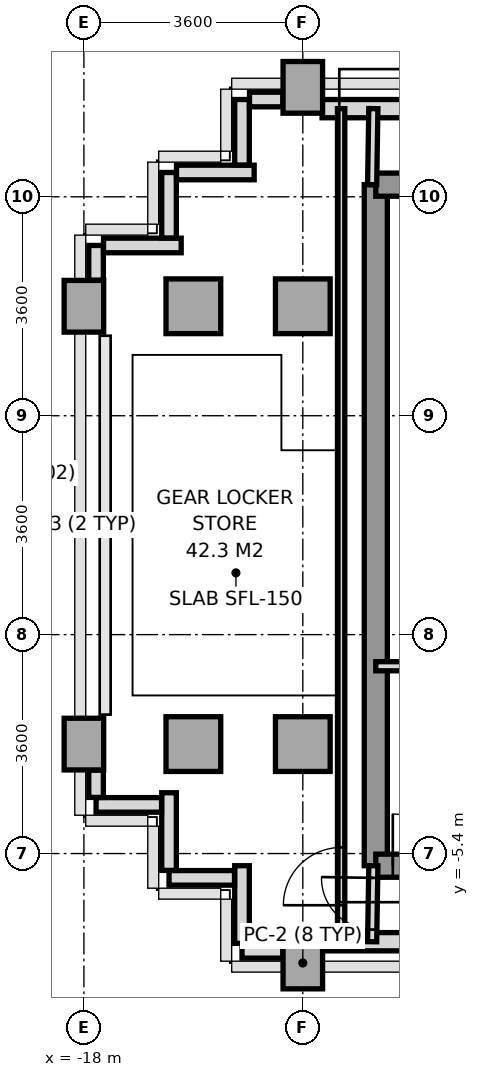
"""IFC4 building model, lengths in metres.
Left out: names, types, materials, properties, quantities, classifications, styles, units other than length and angle.
Written with IfcOpenShell. Run it as: python <this file> out.ifc"""

import sys

from ifc_helpers import new_model, si_unit, direction, frame, frame_2d, origin, origin_2d, place, context, subcontext, project, spatial, rectangle, extrude, source, transform, mapped, element, fill, save


model = new_model("IFC4")
c1 = context("Model", 3, precision=1e-05, world=origin(), true_north=direction((0.0, 1.0)))
c2 = subcontext(c1, "Body", "Model", "MODEL_VIEW")
j1 = project(units=[si_unit("LENGTHUNIT", "METRE"), si_unit("PLANEANGLEUNIT", "RADIAN")], contexts=[c1])
p1 = place(None, origin())
s1 = spatial("IfcSite", under=j1, at=p1, CompositionType="ELEMENT")
p2 = place(p1, origin())
s2 = spatial("IfcBuilding", under=s1, at=p2, CompositionType="ELEMENT")
p3 = place(p2, frame((0.0, 0.0, 160.4)))
s3 = spatial("IfcBuildingStorey", under=s2, at=p3, CompositionType="ELEMENT", Elevation=160.4)
m1 = source(origin(), c2, "Body", "SweptSolid", [
    extrude(rectangle(XDim=0.65, YDim=0.85, at=origin_2d()), origin(), (0.0, 0.0, 1.0), 3.2),
])
for number, where, z_axis, x_axis in (
    (1, (-18.0, -3.6, 0.0), (0.0, 0.0, 1.0), (1.0, 0.0, 0.0)),
    (2, (-18.0, 3.6, 0.0), (0.0, 0.0, 1.0), (1.0, 0.0, 0.0)),
):
    element("IfcColumn", number, at=place(p3, frame(where, z_axis=z_axis, x_axis=x_axis)), inside=s3, PredefinedType="COLUMN", context=c2, shape_type="MappedRepresentation", body=[
        mapped(m1, transform((0.0, 0.0, 0.0), x_axis=(1.0, 0.0, 0.0), y_axis=(0.0, 1.0, 0.0), z_axis=(0.0, 0.0, 1.0), scale=1.0)),
    ])
m2 = source(origin(), c2, "Body", "SweptSolid", [
    extrude(rectangle(XDim=0.9, YDim=0.9, at=origin_2d()), origin(), (0.0, 0.0, 1.0), 3.2),
])
for number, where, z_axis, x_axis in (
    (3, (-16.2, -3.6, 0.0), (0.0, 0.0, 1.0), (1.0, 0.0, 0.0)),
    (4, (-16.2, 3.6, 0.0), (0.0, 0.0, 1.0), (1.0, 0.0, 0.0)),
):
    element("IfcColumn", number, at=place(p3, frame(where, z_axis=z_axis, x_axis=x_axis)), inside=s3, PredefinedType="COLUMN", context=c2, shape_type="MappedRepresentation", body=[
        mapped(m2, transform((0.0, 0.0, 0.0), x_axis=(1.0, 0.0, 0.0), y_axis=(0.0, 1.0, 0.0), z_axis=(0.0, 0.0, 1.0), scale=1.0)),
    ])
p4 = place(p3, frame((-14.4, -7.2, 0.0), z_axis=(0.0, 0.0, 1.0), x_axis=(1.0, 0.0, 0.0)))
e5 = element("IfcColumn", 5, at=p4, inside=s3, PredefinedType="COLUMN", context=c2, shape_type="MappedRepresentation", body=[
    mapped(m1, transform((0.0, 0.0, 0.0), x_axis=(1.0, 0.0, 0.0), y_axis=(0.0, 1.0, 0.0), z_axis=(0.0, 0.0, 1.0), scale=1.0)),
])
for number, where, z_axis, x_axis in (
    (6, (-14.4, -3.6, 0.0), (0.0, 0.0, 1.0), (1.0, 0.0, 0.0)),
    (7, (-14.4, 3.6, 0.0), (0.0, 0.0, 1.0), (1.0, 0.0, 0.0)),
):
    element("IfcColumn", number, at=place(p3, frame(where, z_axis=z_axis, x_axis=x_axis)), inside=s3, PredefinedType="COLUMN", context=c2, shape_type="MappedRepresentation", body=[
        mapped(m2, transform((0.0, 0.0, 0.0), x_axis=(1.0, 0.0, 0.0), y_axis=(0.0, 1.0, 0.0), z_axis=(0.0, 0.0, 1.0), scale=1.0)),
    ])
p5 = place(p3, frame((-14.4, 7.2, 0.0), z_axis=(0.0, 0.0, 1.0), x_axis=(1.0, 0.0, 0.0)))
e8 = element("IfcColumn", 8, at=p5, inside=s3, PredefinedType="COLUMN", context=c2, shape_type="MappedRepresentation", body=[
    mapped(m1, transform((0.0, 0.0, 0.0), x_axis=(1.0, 0.0, 0.0), y_axis=(0.0, 1.0, 0.0), z_axis=(0.0, 0.0, 1.0), scale=1.0)),
])
p6 = place(p3, frame((-14.083, 6.85, 0.0), z_axis=(0.0, 0.0, 1.0), x_axis=(1.0, 0.0, 0.0)))
e9 = element("IfcWall", 9, at=p6, inside=s3, PredefinedType="SOLIDWALL", context=c2, shape_type="SweptSolid", body=[
    extrude(rectangle(XDim=2.635, YDim=0.3, at=frame_2d((1.317, 0.0))), origin(), (0.0, 0.0, 1.0), 3.2),
])
p7 = place(p3, frame((-14.083, -6.85, 0.0), z_axis=(0.0, 0.0, 1.0), x_axis=(1.0, 0.0, 0.0)))
e10 = element("IfcWall", 10, at=p7, inside=s3, PredefinedType="SOLIDWALL", context=c2, shape_type="SweptSolid", body=[
    extrude(rectangle(XDim=2.333, YDim=0.3, at=frame_2d((1.167, 0.0))), origin(), (0.0, 0.0, 1.0), 3.2),
])
p8 = place(p3, frame((-14.728, -7.0, 0.0), z_axis=(0.0, 0.0, 1.0), x_axis=(-1.0, 0.0, 0.0)))
e11 = element("IfcWall", 11, at=p8, inside=s3, PredefinedType="PARAPET", context=c2, shape_type="SweptSolid", body=[
    extrude(rectangle(XDim=0.672, YDim=0.24, at=frame_2d((0.336, 0.0))), origin(), (0.0, 0.0, 1.0), 1.15),
])
p9 = place(p3, frame((-15.4, -6.877, 0.0), z_axis=(0.0, 0.0, 1.0), x_axis=(0.0, 1.0, 0.0)))
e12 = element("IfcWall", 12, at=p9, inside=s3, PredefinedType="PARAPET", context=c2, shape_type="SweptSolid", body=[
    extrude(rectangle(XDim=1.277, YDim=0.24, at=frame_2d((0.638, 0.0))), origin(), (0.0, 0.0, 1.0), 1.15),
])
p10 = place(p3, frame((-15.523, -5.8, 0.0), z_axis=(0.0, 0.0, 1.0), x_axis=(-1.0, 0.0, 0.0)))
e13 = element("IfcWall", 13, at=p10, inside=s3, PredefinedType="PARAPET", context=c2, shape_type="SweptSolid", body=[
    extrude(rectangle(XDim=1.077, YDim=0.24, at=frame_2d((0.539, 0.0))), origin(), (0.0, 0.0, 1.0), 1.15),
])
p11 = place(p3, frame((-16.6, -5.677, 0.0), z_axis=(0.0, 0.0, 1.0), x_axis=(0.0, 1.0, 0.0)))
e14 = element("IfcWall", 14, at=p11, inside=s3, PredefinedType="PARAPET", context=c2, shape_type="SweptSolid", body=[
    extrude(rectangle(XDim=1.277, YDim=0.24, at=frame_2d((0.639, 0.0))), origin(), (0.0, 0.0, 1.0), 1.15),
])
p12 = place(p3, frame((-16.723, -4.6, 0.0), z_axis=(0.0, 0.0, 1.0), x_axis=(-1.0, 0.0, 0.0)))
e15 = element("IfcWall", 15, at=p12, inside=s3, PredefinedType="PARAPET", context=c2, shape_type="SweptSolid", body=[
    extrude(rectangle(XDim=1.077, YDim=0.24, at=frame_2d((0.539, 0.0))), origin(), (0.0, 0.0, 1.0), 1.15),
])
p13 = place(p3, frame((-17.8, -4.477, 0.0), z_axis=(0.0, 0.0, 1.0), x_axis=(0.0, 1.0, 0.0)))
e16 = element("IfcWall", 16, at=p13, inside=s3, PredefinedType="PARAPET", context=c2, shape_type="SweptSolid", body=[
    extrude(rectangle(XDim=0.449, YDim=0.24, at=frame_2d((0.225, 0.0))), origin(), (0.0, 0.0, 1.0), 1.15),
])
p14 = place(p3, frame((-17.8, 4.028, 0.0), z_axis=(0.0, 0.0, 1.0), x_axis=(0.0, 1.0, 0.0)))
e17 = element("IfcWall", 17, at=p14, inside=s3, PredefinedType="PARAPET", context=c2, shape_type="SweptSolid", body=[
    extrude(rectangle(XDim=0.572, YDim=0.24, at=frame_2d((0.286, 0.0))), origin(), (0.0, 0.0, 1.0), 1.15),
])
p15 = place(p3, frame((-17.677, 4.6, 0.0), z_axis=(0.0, 0.0, 1.0), x_axis=(1.0, 0.0, 0.0)))
e18 = element("IfcWall", 18, at=p15, inside=s3, PredefinedType="PARAPET", context=c2, shape_type="SweptSolid", body=[
    extrude(rectangle(XDim=1.277, YDim=0.24, at=frame_2d((0.639, 0.0))), origin(), (0.0, 0.0, 1.0), 1.15),
])
p16 = place(p3, frame((-16.6, 4.723, 0.0), z_axis=(0.0, 0.0, 1.0), x_axis=(0.0, 1.0, 0.0)))
e19 = element("IfcWall", 19, at=p16, inside=s3, PredefinedType="PARAPET", context=c2, shape_type="SweptSolid", body=[
    extrude(rectangle(XDim=1.077, YDim=0.24, at=frame_2d((0.539, 0.0))), origin(), (0.0, 0.0, 1.0), 1.15),
])
p17 = place(p3, frame((-16.477, 5.8, 0.0), z_axis=(0.0, 0.0, 1.0), x_axis=(1.0, 0.0, 0.0)))
e20 = element("IfcWall", 20, at=p17, inside=s3, PredefinedType="PARAPET", context=c2, shape_type="SweptSolid", body=[
    extrude(rectangle(XDim=1.277, YDim=0.24, at=frame_2d((0.639, 0.0))), origin(), (0.0, 0.0, 1.0), 1.15),
])
p18 = place(p3, frame((-15.4, 5.923, 0.0), z_axis=(0.0, 0.0, 1.0), x_axis=(0.0, 1.0, 0.0)))
e21 = element("IfcWall", 21, at=p18, inside=s3, PredefinedType="PARAPET", context=c2, shape_type="SweptSolid", body=[
    extrude(rectangle(XDim=1.077, YDim=0.24, at=frame_2d((0.539, 0.0))), origin(), (0.0, 0.0, 1.0), 1.15),
])
p19 = place(p3, frame((-15.277, 7.0, 0.0), z_axis=(0.0, 0.0, 1.0), x_axis=(1.0, 0.0, 0.0)))
e22 = element("IfcWall", 22, at=p19, inside=s3, PredefinedType="PARAPET", context=c2, shape_type="SweptSolid", body=[
    extrude(rectangle(XDim=0.549, YDim=0.24, at=frame_2d((0.274, 0.0))), origin(), (0.0, 0.0, 1.0), 1.15),
])
p20 = place(p3, frame((-13.2, -5.6, 0.0), z_axis=(0.0, 0.0, 1.0), x_axis=(0.0, 1.0, 0.0)))
e23 = element("IfcWall", 23, at=p20, inside=s3, PredefinedType="SHEAR", context=c2, shape_type="SweptSolid", body=[
    extrude(rectangle(XDim=11.2, YDim=0.38, at=frame_2d((5.6, 0.0))), origin(), (0.0, 0.0, 1.0), 3.2),
])
p21 = place(p3, frame((-13.2, 5.6, 0.0), z_axis=(0.0, 0.0, 1.0), x_axis=(1.0, 0.0, 0.0)))
e24 = element("IfcWall", 24, at=p21, inside=s3, PredefinedType="SHEAR", context=c2, shape_type="SweptSolid", body=[
    extrude(rectangle(XDim=1.844, YDim=0.38, at=frame_2d((0.922, 0.0))), origin(), (0.0, 0.0, 1.0), 3.2),
])
p22 = place(p3, frame((-13.2, -5.6, 0.0), z_axis=(0.0, 0.0, 1.0), x_axis=(1.0, 0.0, 0.0)))
e25 = element("IfcWall", 25, at=p22, inside=s3, PredefinedType="SHEAR", context=c2, shape_type="SweptSolid", body=[
    extrude(rectangle(XDim=7.8, YDim=0.38, at=frame_2d((3.9, 0.0))), origin(), (0.0, 0.0, 1.0), 3.2),
])
p23 = place(p22, frame((3.6, 0.0, 0.0)))
e26 = element("IfcOpeningElement", 26, at=p23, cuts=e25, PredefinedType="OPENING", context=c2, shape_type="SweptSolid", body=[
    extrude(rectangle(XDim=1.2, YDim=2.2, at=frame_2d((0.6, 1.1))), frame((0.0, 0.2, 0.0), z_axis=(0.0, -1.0, 0.0), x_axis=(1.0, 0.0, 0.0)), (0.0, 0.0, 1.0), 0.4),
])
p24 = place(p22, frame((0.28, 0.0, 0.0)))
e27 = element("IfcOpeningElement", 27, at=p24, cuts=e25, PredefinedType="OPENING", context=c2, shape_type="SweptSolid", body=[
    extrude(rectangle(XDim=0.85, YDim=2.1, at=frame_2d((0.425, 1.05))), frame((0.0, 0.2, 0.0), z_axis=(0.0, -1.0, 0.0), x_axis=(1.0, 0.0, 0.0)), (0.0, 0.0, 1.0), 0.4),
])
p25 = place(p22, frame((1.36, 0.0, 0.0)))
e28 = element("IfcOpeningElement", 28, at=p25, cuts=e25, PredefinedType="OPENING", context=c2, shape_type="SweptSolid", body=[
    extrude(rectangle(XDim=0.85, YDim=2.1, at=frame_2d((0.425, 1.05))), frame((0.0, 0.2, 0.0), z_axis=(0.0, -1.0, 0.0), x_axis=(1.0, 0.0, 0.0)), (0.0, 0.0, 1.0), 0.4),
])
p26 = place(p3, frame((-13.2, -2.32, 0.0), z_axis=(0.0, 0.0, 1.0), x_axis=(1.0, 0.0, 0.0)))
e29 = element("IfcWall", 29, at=p26, inside=s3, PredefinedType="PARTITIONING", context=c2, shape_type="SweptSolid", body=[
    extrude(rectangle(XDim=2.18, YDim=0.15, at=frame_2d((1.09, 0.0))), origin(), (0.0, 0.0, 1.0), 3.2),
])
p27 = place(p3, frame((-13.26, 5.6, 0.0), z_axis=(0.0, 0.0, 1.0), x_axis=(0.016013571389, 0.999871774545, 0.0)))
e30 = element("IfcWall", 30, at=p27, inside=s3, PredefinedType="PARTITIONING", context=c2, shape_type="SweptSolid", body=[
    extrude(rectangle(XDim=1.25, YDim=0.15, at=frame_2d((0.625, 0.0))), origin(), (0.0, 0.0, 1.0), 3.2),
])
p28 = place(p3, frame((-13.26, -6.85, 0.0), z_axis=(0.0, 0.0, 1.0), x_axis=(0.016013571389, 0.999871774545, 0.0)))
e31 = element("IfcWall", 31, at=p28, inside=s3, PredefinedType="PARTITIONING", context=c2, shape_type="SweptSolid", body=[
    extrude(rectangle(XDim=1.25, YDim=0.15, at=frame_2d((0.625, 0.0))), origin(), (0.0, 0.0, 1.0), 3.2),
])
p29 = place(p28, frame((0.2, 0.0, 0.0)))
e32 = element("IfcOpeningElement", 32, at=p29, cuts=e31, PredefinedType="OPENING", context=c2, shape_type="SweptSolid", body=[
    extrude(rectangle(XDim=0.85, YDim=2.1, at=frame_2d((0.425, 1.05))), frame((0.0, 0.085, 0.0), z_axis=(0.0, -1.0, 0.0), x_axis=(1.0, 0.0, 0.0)), (0.0, 0.0, 1.0), 0.17),
])
p30 = place(p3, frame((-13.77, -6.85, 0.0), z_axis=(0.0, 0.0, 1.0), x_axis=(0.0, 1.0, 0.0)))
e33 = element("IfcWall", 33, at=p30, inside=s3, PredefinedType="PARTITIONING", context=c2, shape_type="SweptSolid", body=[
    extrude(rectangle(XDim=13.7, YDim=0.12, at=frame_2d((6.85, 0.0))), origin(), (0.0, 0.0, 1.0), 2.87),
])
p31 = place(p30, frame((0.6, 0.0, 0.0)))
e34 = element("IfcOpeningElement", 34, at=p31, cuts=e33, PredefinedType="OPENING", context=c2, shape_type="SweptSolid", body=[
    extrude(rectangle(XDim=0.95, YDim=2.15, at=frame_2d((0.475, 1.075))), frame((0.0, 0.07, 0.0), z_axis=(0.0, -1.0, 0.0), x_axis=(1.0, 0.0, 0.0)), (0.0, 0.0, 1.0), 0.14),
])
m3 = source(origin(), c2, "Body", "SweptSolid", [
    extrude(rectangle(XDim=0.85, YDim=2.1, at=frame_2d((0.425, 1.05))), frame((0.0, 0.025, 0.0), z_axis=(0.0, -1.0, 0.0), x_axis=(1.0, 0.0, 0.0)), (0.0, 0.0, 1.0), 0.05),
])
p32 = place(p24, origin())
e35 = element("IfcDoor", 35, at=p32, inside=s3, OperationType="SINGLE_SWING_LEFT", PredefinedType="DOOR", context=c2, shape_type="MappedRepresentation", body=[
    mapped(m3, transform((0.0, 0.0, 0.0), x_axis=(1.0, 0.0, 0.0), y_axis=(0.0, 1.0, 0.0), z_axis=(0.0, 0.0, 1.0), scale=1.0)),
])
fill(e27, e35)
m4 = source(origin(), c2, "Body", "SweptSolid", [
    extrude(rectangle(XDim=0.95, YDim=2.15, at=frame_2d((0.475, 1.075))), frame((0.0, 0.025, 0.0), z_axis=(0.0, -1.0, 0.0), x_axis=(1.0, 0.0, 0.0)), (0.0, 0.0, 1.0), 0.05),
])
p33 = place(p31, origin())
e36 = element("IfcDoor", 36, at=p33, inside=s3, OperationType="SINGLE_SWING_LEFT", PredefinedType="DOOR", context=c2, shape_type="MappedRepresentation", body=[
    mapped(m4, transform((0.0, 0.0, 0.0), x_axis=(1.0, 0.0, 0.0), y_axis=(0.0, 1.0, 0.0), z_axis=(0.0, 0.0, 1.0), scale=1.0)),
])
fill(e34, e36)
p34 = place(p29, origin())
e37 = element("IfcDoor", 37, at=p34, inside=s3, OperationType="SINGLE_SWING_RIGHT", PredefinedType="DOOR", context=c2, shape_type="MappedRepresentation", body=[
    mapped(m3, transform((0.0, 0.0, 0.0), x_axis=(1.0, 0.0, 0.0), y_axis=(0.0, 1.0, 0.0), z_axis=(0.0, 0.0, 1.0), scale=1.0)),
])
fill(e32, e37)
save(model, sys.argv[1])
